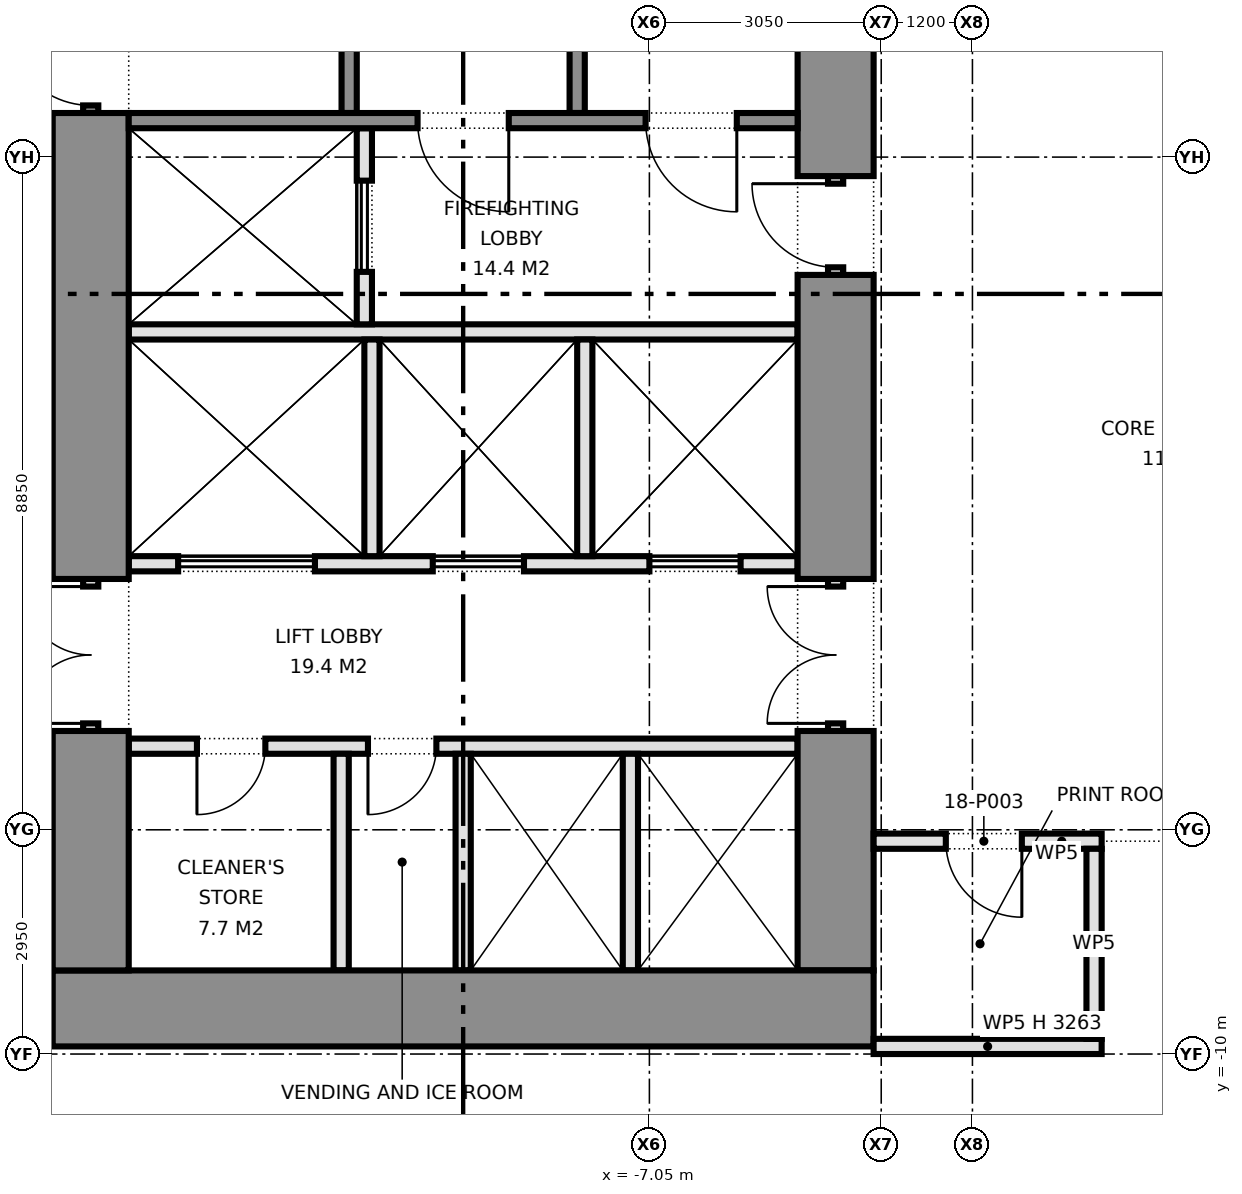
"""IFC4 building model, lengths in metres.
Left out: names, types, materials, properties, quantities, classifications, styles, units other than length and angle.
Written with IfcOpenShell. Run it as: python <this file> out.ifc"""

import sys

from ifc_helpers import new_model, si_unit, direction, frame, frame_2d, origin, place, context, subcontext, project, spatial, rectangle, extrude, element, fill, save


model = new_model("IFC4")
c1 = context("Model", 3, precision=1e-05, world=origin(), true_north=direction((0.0, 1.0)))
c2 = subcontext(c1, "Body", "Model", "MODEL_VIEW")
j1 = project(units=[si_unit("LENGTHUNIT", "METRE"), si_unit("PLANEANGLEUNIT", "RADIAN")], contexts=[c1])
p1 = place(None, origin())
s1 = spatial("IfcSite", under=j1, at=p1, CompositionType="ELEMENT")
p2 = place(p1, origin())
s2 = spatial("IfcBuilding", under=s1, at=p2, CompositionType="ELEMENT")
p3 = place(p2, frame((0.0, 0.0, 82.0)))
s3 = spatial("IfcBuildingStorey", under=s2, at=p3, CompositionType="ELEMENT", Elevation=82.0)
p4 = place(p3, frame((-14.9, -9.4, 0.0), z_axis=(0.0, 0.0, 1.0), x_axis=(1.0, 0.0, 0.0)))
e1 = element("IfcWall", 1, at=p4, inside=s3, PredefinedType="SHEAR", context=c2, shape_type="SweptSolid", body=[
    extrude(rectangle(XDim=10.8, YDim=1.0, at=frame_2d((5.4, 0.0))), origin(), (0.0, 0.0, 1.0), 4.2),
])
p5 = place(p3, frame((-14.4, -8.9, 0.0), z_axis=(0.0, 0.0, 1.0), x_axis=(0.0, 1.0, 0.0)))
e2 = element("IfcWall", 2, at=p5, inside=s3, PredefinedType="SHEAR", context=c2, shape_type="SweptSolid", body=[
    extrude(rectangle(XDim=3.15, YDim=1.0, at=frame_2d((1.575, 0.0))), origin(), (0.0, 0.0, 1.0), 4.2),
])
p6 = place(p3, frame((-14.4, -5.75, 0.0), z_axis=(0.0, 0.0, 1.0), x_axis=(0.0, 1.0, 0.0)))
e3 = element("IfcWall", 3, at=p6, inside=s3, PredefinedType="PARTITIONING", context=c2, shape_type="SweptSolid", body=[
    extrude(rectangle(XDim=2.0, YDim=0.2, at=frame_2d((1.0, 0.0))), origin(), (0.0, 0.0, 1.0), 2.4),
])
p7 = place(p6, frame((0.1, 0.0, 0.0)))
e4 = element("IfcOpeningElement", 4, at=p7, cuts=e3, PredefinedType="OPENING", context=c2, shape_type="SweptSolid", body=[
    extrude(rectangle(XDim=1.8, YDim=2.1, at=frame_2d((0.9, 1.05))), frame((0.0, 0.11, 0.0), z_axis=(0.0, -1.0, 0.0), x_axis=(1.0, 0.0, 0.0)), (0.0, 0.0, 1.0), 0.22),
])
p8 = place(p3, frame((-14.4, -3.75, 0.0), z_axis=(0.0, 0.0, 1.0), x_axis=(0.0, 1.0, 0.0)))
e5 = element("IfcWall", 5, at=p8, inside=s3, PredefinedType="SHEAR", context=c2, shape_type="SweptSolid", body=[
    extrude(rectangle(XDim=6.13, YDim=1.0, at=frame_2d((3.065, 0.0))), origin(), (0.0, 0.0, 1.0), 4.2),
])
p9 = place(p3, frame((-14.4, 2.38, 0.0), z_axis=(0.0, 0.0, 1.0), x_axis=(0.0, 1.0, 0.0)))
e6 = element("IfcWall", 6, at=p9, inside=s3, PredefinedType="SHEAR", context=c2, shape_type="SweptSolid", body=[
    extrude(rectangle(XDim=1.3, YDim=0.2, at=frame_2d((0.65, 0.0))), origin(), (0.0, 0.0, 1.0), 2.4),
])
p10 = place(p9, frame((0.1, 0.0, 0.0)))
e7 = element("IfcOpeningElement", 7, at=p10, cuts=e6, PredefinedType="OPENING", context=c2, shape_type="SweptSolid", body=[
    extrude(rectangle(XDim=1.1, YDim=2.1, at=frame_2d((0.55, 1.05))), frame((0.0, 0.11, 0.0), z_axis=(0.0, -1.0, 0.0), x_axis=(1.0, 0.0, 0.0)), (0.0, 0.0, 1.0), 0.22),
])
p11 = place(p3, frame((-4.6, -8.9, 0.0), z_axis=(0.0, 0.0, 1.0), x_axis=(0.0, 1.0, 0.0)))
e8 = element("IfcWall", 8, at=p11, inside=s3, PredefinedType="SHEAR", context=c2, shape_type="SweptSolid", body=[
    extrude(rectangle(XDim=3.15, YDim=1.0, at=frame_2d((1.575, 0.0))), origin(), (0.0, 0.0, 1.0), 4.2),
])
p12 = place(p3, frame((-4.6, -5.75, 0.0), z_axis=(0.0, 0.0, 1.0), x_axis=(0.0, 1.0, 0.0)))
e9 = element("IfcWall", 9, at=p12, inside=s3, PredefinedType="PARTITIONING", context=c2, shape_type="SweptSolid", body=[
    extrude(rectangle(XDim=2.0, YDim=0.2, at=frame_2d((1.0, 0.0))), origin(), (0.0, 0.0, 1.0), 2.4),
])
p13 = place(p12, frame((0.1, 0.0, 0.0)))
e10 = element("IfcOpeningElement", 10, at=p13, cuts=e9, PredefinedType="OPENING", context=c2, shape_type="SweptSolid", body=[
    extrude(rectangle(XDim=1.8, YDim=2.1, at=frame_2d((0.9, 1.05))), frame((0.0, 0.11, 0.0), z_axis=(0.0, -1.0, 0.0), x_axis=(1.0, 0.0, 0.0)), (0.0, 0.0, 1.0), 0.22),
])
p14 = place(p3, frame((-4.6, -3.75, 0.0), z_axis=(0.0, 0.0, 1.0), x_axis=(0.0, 1.0, 0.0)))
e11 = element("IfcWall", 11, at=p14, inside=s3, PredefinedType="SHEAR", context=c2, shape_type="SweptSolid", body=[
    extrude(rectangle(XDim=4.0, YDim=1.0, at=frame_2d((2.0, 0.0))), origin(), (0.0, 0.0, 1.0), 4.2),
])
p15 = place(p3, frame((-4.6, 0.25, 0.0), z_axis=(0.0, 0.0, 1.0), x_axis=(0.0, 1.0, 0.0)))
e12 = element("IfcWall", 12, at=p15, inside=s3, PredefinedType="PARTITIONING", context=c2, shape_type="SweptSolid", body=[
    extrude(rectangle(XDim=1.3, YDim=0.2, at=frame_2d((0.65, 0.0))), origin(), (0.0, 0.0, 1.0), 2.4),
])
p16 = place(p15, frame((0.1, 0.0, 0.0)))
e13 = element("IfcOpeningElement", 13, at=p16, cuts=e12, PredefinedType="OPENING", context=c2, shape_type="SweptSolid", body=[
    extrude(rectangle(XDim=1.1, YDim=2.1, at=frame_2d((0.55, 1.05))), frame((0.0, 0.11, 0.0), z_axis=(0.0, -1.0, 0.0), x_axis=(1.0, 0.0, 0.0)), (0.0, 0.0, 1.0), 0.22),
])
p17 = place(p3, frame((-4.6, 1.55, 0.0), z_axis=(0.0, 0.0, 1.0), x_axis=(0.0, 1.0, 0.0)))
e14 = element("IfcWall", 14, at=p17, inside=s3, PredefinedType="SHEAR", context=c2, shape_type="SweptSolid", body=[
    extrude(rectangle(XDim=7.35, YDim=1.0, at=frame_2d((3.675, 0.0))), origin(), (0.0, 0.0, 1.0), 4.2),
])
p18 = place(p3, frame((-13.9, -5.95, 0.0), z_axis=(0.0, 0.0, 1.0), x_axis=(1.0, 0.0, 0.0)))
e15 = element("IfcWall", 15, at=p18, inside=s3, PredefinedType="PARTITIONING", context=c2, shape_type="SweptSolid", body=[
    extrude(rectangle(XDim=8.8, YDim=0.2, at=frame_2d((4.4, 0.0))), origin(), (0.0, 0.0, 1.0), 4.2),
])
p19 = place(p18, frame((0.897, 0.0, 0.0)))
e16 = element("IfcOpeningElement", 16, at=p19, cuts=e15, PredefinedType="OPENING", context=c2, shape_type="SweptSolid", body=[
    extrude(rectangle(XDim=0.9, YDim=2.1, at=frame_2d((0.45, 1.05))), frame((0.0, 0.11, 0.0), z_axis=(0.0, -1.0, 0.0), x_axis=(1.0, 0.0, 0.0)), (0.0, 0.0, 1.0), 0.22),
])
p20 = place(p18, frame((3.147, 0.0, 0.0)))
e17 = element("IfcOpeningElement", 17, at=p20, cuts=e15, PredefinedType="OPENING", context=c2, shape_type="SweptSolid", body=[
    extrude(rectangle(XDim=0.9, YDim=2.1, at=frame_2d((0.45, 1.05))), frame((0.0, 0.11, 0.0), z_axis=(0.0, -1.0, 0.0), x_axis=(1.0, 0.0, 0.0)), (0.0, 0.0, 1.0), 0.22),
])
p21 = place(p3, frame((-13.9, -3.55, 0.0), z_axis=(0.0, 0.0, 1.0), x_axis=(1.0, 0.0, 0.0)))
e18 = element("IfcWall", 18, at=p21, inside=s3, PredefinedType="PARTITIONING", context=c2, shape_type="SweptSolid", body=[
    extrude(rectangle(XDim=8.8, YDim=0.2, at=frame_2d((4.4, 0.0))), origin(), (0.0, 0.0, 1.0), 4.2),
])
p22 = place(p21, frame((0.65, 0.0, 0.0)))
e19 = element("IfcOpeningElement", 19, at=p22, cuts=e18, PredefinedType="OPENING", context=c2, shape_type="SweptSolid", body=[
    extrude(rectangle(XDim=1.8, YDim=2.1, at=frame_2d((0.9, 1.05))), frame((0.0, 0.11, 0.0), z_axis=(0.0, -1.0, 0.0), x_axis=(1.0, 0.0, 0.0)), (0.0, 0.0, 1.0), 0.22),
])
p23 = place(p21, frame((4.0, 0.0, 0.0)))
e20 = element("IfcOpeningElement", 20, at=p23, cuts=e18, PredefinedType="OPENING", context=c2, shape_type="SweptSolid", body=[
    extrude(rectangle(XDim=1.2, YDim=2.1, at=frame_2d((0.6, 1.05))), frame((0.0, 0.11, 0.0), z_axis=(0.0, -1.0, 0.0), x_axis=(1.0, 0.0, 0.0)), (0.0, 0.0, 1.0), 0.22),
])
p24 = place(p21, frame((6.85, 0.0, 0.0)))
e21 = element("IfcOpeningElement", 21, at=p24, cuts=e18, PredefinedType="OPENING", context=c2, shape_type="SweptSolid", body=[
    extrude(rectangle(XDim=1.2, YDim=2.1, at=frame_2d((0.6, 1.05))), frame((0.0, 0.11, 0.0), z_axis=(0.0, -1.0, 0.0), x_axis=(1.0, 0.0, 0.0)), (0.0, 0.0, 1.0), 0.22),
])
p25 = place(p3, frame((-13.9, -0.5, 0.0), z_axis=(0.0, 0.0, 1.0), x_axis=(1.0, 0.0, 0.0)))
e22 = element("IfcWall", 22, at=p25, inside=s3, PredefinedType="PARTITIONING", context=c2, shape_type="SweptSolid", body=[
    extrude(rectangle(XDim=8.8, YDim=0.2, at=frame_2d((4.4, 0.0))), origin(), (0.0, 0.0, 1.0), 4.2),
])
p26 = place(p3, frame((-10.8, -0.4, 0.0), z_axis=(0.0, 0.0, 1.0), x_axis=(0.0, 1.0, 0.0)))
e23 = element("IfcWall", 23, at=p26, inside=s3, PredefinedType="PARTITIONING", context=c2, shape_type="SweptSolid", body=[
    extrude(rectangle(XDim=2.58, YDim=0.2, at=frame_2d((1.29, 0.0))), origin(), (0.0, 0.0, 1.0), 4.2),
])
p27 = place(p26, frame((0.69, 0.0, 0.0)))
e24 = element("IfcOpeningElement", 24, at=p27, cuts=e23, PredefinedType="OPENING", context=c2, shape_type="SweptSolid", body=[
    extrude(rectangle(XDim=1.2, YDim=2.1, at=frame_2d((0.6, 1.05))), frame((0.0, 0.11, 0.0), z_axis=(0.0, -1.0, 0.0), x_axis=(1.0, 0.0, 0.0)), (0.0, 0.0, 1.0), 0.22),
])
p28 = place(p3, frame((-13.9, 2.28, 0.0), z_axis=(0.0, 0.0, 1.0), x_axis=(1.0, 0.0, 0.0)))
e25 = element("IfcWall", 25, at=p28, inside=s3, PredefinedType="SHEAR", context=c2, shape_type="SweptSolid", body=[
    extrude(rectangle(XDim=8.8, YDim=0.2, at=frame_2d((4.4, 0.0))), origin(), (0.0, 0.0, 1.0), 4.2),
])
p29 = place(p28, frame((3.8, 0.0, 0.0)))
e26 = element("IfcOpeningElement", 26, at=p29, cuts=e25, PredefinedType="OPENING", context=c2, shape_type="SweptSolid", body=[
    extrude(rectangle(XDim=1.2, YDim=2.1, at=frame_2d((0.6, 1.05))), frame((0.0, 0.11, 0.0), z_axis=(0.0, -1.0, 0.0), x_axis=(1.0, 0.0, 0.0)), (0.0, 0.0, 1.0), 0.22),
])
p30 = place(p28, frame((6.8, 0.0, 0.0)))
e27 = element("IfcOpeningElement", 27, at=p30, cuts=e25, PredefinedType="OPENING", context=c2, shape_type="SweptSolid", body=[
    extrude(rectangle(XDim=1.2, YDim=2.1, at=frame_2d((0.6, 1.05))), frame((0.0, 0.11, 0.0), z_axis=(0.0, -1.0, 0.0), x_axis=(1.0, 0.0, 0.0)), (0.0, 0.0, 1.0), 0.22),
])
for number, where, z_axis, x_axis in (
    (28, (-11.0, 2.38, 0.0), (0.0, 0.0, 1.0), (0.0, 1.0, 0.0)),
    (29, (-8.0, 2.38, 0.0), (0.0, 0.0, 1.0), (0.0, 1.0, 0.0)),
):
    element("IfcWall", number, at=place(p3, frame(where, z_axis=z_axis, x_axis=x_axis)), inside=s3, PredefinedType="SHEAR", context=c2, shape_type="SweptSolid", body=[
        extrude(rectangle(XDim=6.52, YDim=0.2, at=frame_2d((3.26, 0.0))), origin(), (0.0, 0.0, 1.0), 4.2),
    ])
for number, where, z_axis, x_axis in (
    (30, (-9.5, -8.9, 0.0), (0.0, 0.0, 1.0), (0.0, 1.0, 0.0)),
    (31, (-7.3, -8.9, 0.0), (0.0, 0.0, 1.0), (0.0, 1.0, 0.0)),
    (32, (-11.105, -8.9, 0.0), (0.0, 0.0, 1.0), (0.0, 1.0, 0.0)),
    (33, (-10.7, -3.45, 0.0), (0.0, 0.0, 1.0), (0.0, 1.0, 0.0)),
    (34, (-7.9, -3.45, 0.0), (0.0, 0.0, 1.0), (0.0, 1.0, 0.0)),
):
    element("IfcWall", number, at=place(p3, frame(where, z_axis=z_axis, x_axis=x_axis)), inside=s3, PredefinedType="PARTITIONING", context=c2, shape_type="SweptSolid", body=[
        extrude(rectangle(XDim=2.85, YDim=0.2, at=frame_2d((1.425, 0.0))), origin(), (0.0, 0.0, 1.0), 4.2),
    ])
p31 = place(p3, frame((-4.1, -9.9, 0.0), z_axis=(0.0, 0.0, 1.0), x_axis=(1.0, 0.0, 0.0)))
e35 = element("IfcWall", 35, at=p31, inside=s3, PredefinedType="PARTITIONING", context=c2, shape_type="SweptSolid", body=[
    extrude(rectangle(XDim=3.0, YDim=0.2, at=frame_2d((1.5, 0.0))), origin(), (0.0, 0.0, 1.0), 3.263),
])
p32 = place(p3, frame((-4.1, -7.2, 0.0), z_axis=(0.0, 0.0, 1.0), x_axis=(1.0, 0.0, 0.0)))
e36 = element("IfcWall", 36, at=p32, inside=s3, PredefinedType="PARTITIONING", context=c2, shape_type="SweptSolid", body=[
    extrude(rectangle(XDim=3.0, YDim=0.2, at=frame_2d((1.5, 0.0))), origin(), (0.0, 0.0, 1.0), 4.2),
])
p33 = place(p32, frame((0.95, 0.0, 0.0)))
e37 = element("IfcOpeningElement", 37, at=p33, cuts=e36, PredefinedType="OPENING", context=c2, shape_type="SweptSolid", body=[
    extrude(rectangle(XDim=1.0, YDim=2.1, at=frame_2d((0.5, 1.05))), frame((0.0, 0.11, 0.0), z_axis=(0.0, -1.0, 0.0), x_axis=(1.0, 0.0, 0.0)), (0.0, 0.0, 1.0), 0.22),
])
p34 = place(p3, frame((-1.2, -9.8, 0.0), z_axis=(0.0, 0.0, 1.0), x_axis=(0.0, 1.0, 0.0)))
e38 = element("IfcWall", 38, at=p34, inside=s3, PredefinedType="PARTITIONING", context=c2, shape_type="SweptSolid", body=[
    extrude(rectangle(XDim=2.5, YDim=0.2, at=frame_2d((1.25, 0.0))), origin(), (0.0, 0.0, 1.0), 4.2),
])
p35 = place(p7, origin())
e39 = element("IfcDoor", 39, at=p35, inside=s3, OperationType="DOUBLE_DOOR_SINGLE_SWING", PredefinedType="DOOR", context=c2, shape_type="SweptSolid", body=[
    extrude(rectangle(XDim=1.8, YDim=2.1, at=frame_2d((0.9, 1.05))), frame((0.0, 0.025, 0.0), z_axis=(0.0, -1.0, 0.0), x_axis=(1.0, 0.0, 0.0)), (0.0, 0.0, 1.0), 0.05),
])
fill(e4, e39)
p36 = place(p10, origin())
e40 = element("IfcDoor", 40, at=p36, inside=s3, OperationType="SINGLE_SWING_RIGHT", PredefinedType="DOOR", context=c2, shape_type="SweptSolid", body=[
    extrude(rectangle(XDim=1.1, YDim=2.1, at=frame_2d((0.55, 1.05))), frame((0.0, 0.025, 0.0), z_axis=(0.0, -1.0, 0.0), x_axis=(1.0, 0.0, 0.0)), (0.0, 0.0, 1.0), 0.05),
])
fill(e7, e40)
p37 = place(p13, origin())
e41 = element("IfcDoor", 41, at=p37, inside=s3, OperationType="DOUBLE_DOOR_SINGLE_SWING", PredefinedType="DOOR", context=c2, shape_type="SweptSolid", body=[
    extrude(rectangle(XDim=1.8, YDim=2.1, at=frame_2d((0.9, 1.05))), frame((0.0, 0.025, 0.0), z_axis=(0.0, -1.0, 0.0), x_axis=(1.0, 0.0, 0.0)), (0.0, 0.0, 1.0), 0.05),
])
fill(e10, e41)
p38 = place(p16, origin())
e42 = element("IfcDoor", 42, at=p38, inside=s3, OperationType="SINGLE_SWING_RIGHT", PredefinedType="DOOR", context=c2, shape_type="SweptSolid", body=[
    extrude(rectangle(XDim=1.1, YDim=2.1, at=frame_2d((0.55, 1.05))), frame((0.0, 0.025, 0.0), z_axis=(0.0, -1.0, 0.0), x_axis=(1.0, 0.0, 0.0)), (0.0, 0.0, 1.0), 0.05),
])
fill(e13, e42)
p39 = place(p22, origin())
e43 = element("IfcDoor", 43, at=p39, inside=s3, OperationType="DOUBLE_DOOR_SLIDING", PredefinedType="DOOR", context=c2, shape_type="SweptSolid", body=[
    extrude(rectangle(XDim=1.8, YDim=2.1, at=frame_2d((0.9, 1.05))), frame((0.0, 0.025, 0.0), z_axis=(0.0, -1.0, 0.0), x_axis=(1.0, 0.0, 0.0)), (0.0, 0.0, 1.0), 0.05),
])
fill(e19, e43)
p40 = place(p23, origin())
e44 = element("IfcDoor", 44, at=p40, inside=s3, OperationType="DOUBLE_DOOR_SLIDING", PredefinedType="DOOR", context=c2, shape_type="SweptSolid", body=[
    extrude(rectangle(XDim=1.2, YDim=2.1, at=frame_2d((0.6, 1.05))), frame((0.0, 0.025, 0.0), z_axis=(0.0, -1.0, 0.0), x_axis=(1.0, 0.0, 0.0)), (0.0, 0.0, 1.0), 0.05),
])
fill(e20, e44)
p41 = place(p24, origin())
e45 = element("IfcDoor", 45, at=p41, inside=s3, OperationType="DOUBLE_DOOR_SLIDING", PredefinedType="DOOR", context=c2, shape_type="SweptSolid", body=[
    extrude(rectangle(XDim=1.2, YDim=2.1, at=frame_2d((0.6, 1.05))), frame((0.0, 0.025, 0.0), z_axis=(0.0, -1.0, 0.0), x_axis=(1.0, 0.0, 0.0)), (0.0, 0.0, 1.0), 0.05),
])
fill(e21, e45)
p42 = place(p27, origin())
e46 = element("IfcDoor", 46, at=p42, inside=s3, OperationType="DOUBLE_DOOR_SLIDING", PredefinedType="DOOR", context=c2, shape_type="SweptSolid", body=[
    extrude(rectangle(XDim=1.2, YDim=2.1, at=frame_2d((0.6, 1.05))), frame((0.0, 0.025, 0.0), z_axis=(0.0, -1.0, 0.0), x_axis=(1.0, 0.0, 0.0)), (0.0, 0.0, 1.0), 0.05),
])
fill(e24, e46)
p43 = place(p19, frame((0.9, 0.0, 0.0), z_axis=(0.0, 0.0, 1.0), x_axis=(-1.0, 0.0, 0.0)))
e47 = element("IfcDoor", 47, at=p43, inside=s3, OperationType="SINGLE_SWING_RIGHT", PredefinedType="DOOR", context=c2, shape_type="SweptSolid", body=[
    extrude(rectangle(XDim=0.9, YDim=2.1, at=frame_2d((0.45, 1.05))), frame((0.0, 0.025, 0.0), z_axis=(0.0, -1.0, 0.0), x_axis=(1.0, 0.0, 0.0)), (0.0, 0.0, 1.0), 0.05),
])
fill(e16, e47)
p44 = place(p20, frame((0.9, 0.0, 0.0), z_axis=(0.0, 0.0, 1.0), x_axis=(-1.0, 0.0, 0.0)))
e48 = element("IfcDoor", 48, at=p44, inside=s3, OperationType="SINGLE_SWING_RIGHT", PredefinedType="DOOR", context=c2, shape_type="SweptSolid", body=[
    extrude(rectangle(XDim=0.9, YDim=2.1, at=frame_2d((0.45, 1.05))), frame((0.0, 0.025, 0.0), z_axis=(0.0, -1.0, 0.0), x_axis=(1.0, 0.0, 0.0)), (0.0, 0.0, 1.0), 0.05),
])
fill(e17, e48)
p45 = place(p29, frame((1.2, 0.0, 0.0), z_axis=(0.0, 0.0, 1.0), x_axis=(-1.0, 0.0, 0.0)))
e49 = element("IfcDoor", 49, at=p45, inside=s3, OperationType="SINGLE_SWING_LEFT", PredefinedType="DOOR", context=c2, shape_type="SweptSolid", body=[
    extrude(rectangle(XDim=1.2, YDim=2.1, at=frame_2d((0.6, 1.05))), frame((0.0, 0.025, 0.0), z_axis=(0.0, -1.0, 0.0), x_axis=(1.0, 0.0, 0.0)), (0.0, 0.0, 1.0), 0.05),
])
fill(e26, e49)
p46 = place(p30, frame((1.2, 0.0, 0.0), z_axis=(0.0, 0.0, 1.0), x_axis=(-1.0, 0.0, 0.0)))
e50 = element("IfcDoor", 50, at=p46, inside=s3, OperationType="SINGLE_SWING_LEFT", PredefinedType="DOOR", context=c2, shape_type="SweptSolid", body=[
    extrude(rectangle(XDim=1.2, YDim=2.1, at=frame_2d((0.6, 1.05))), frame((0.0, 0.025, 0.0), z_axis=(0.0, -1.0, 0.0), x_axis=(1.0, 0.0, 0.0)), (0.0, 0.0, 1.0), 0.05),
])
fill(e27, e50)
p47 = place(p33, frame((1.0, 0.0, 0.0), z_axis=(0.0, 0.0, 1.0), x_axis=(-1.0, 0.0, 0.0)))
e51 = element("IfcDoor", 51, at=p47, inside=s3, OperationType="SINGLE_SWING_LEFT", PredefinedType="DOOR", context=c2, shape_type="SweptSolid", body=[
    extrude(rectangle(XDim=1.0, YDim=2.1, at=frame_2d((0.5, 1.05))), frame((0.0, 0.025, 0.0), z_axis=(0.0, -1.0, 0.0), x_axis=(1.0, 0.0, 0.0)), (0.0, 0.0, 1.0), 0.05),
])
fill(e37, e51)
save(model, sys.argv[1])
